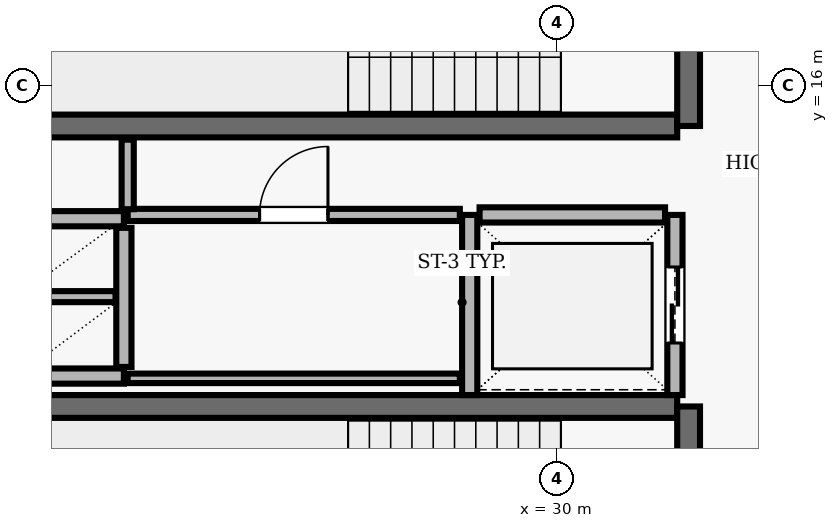
"""IFC4 building model, lengths in metres.
Left out: names, types, materials, properties, quantities, classifications, styles, units other than length and angle.
Written with IfcOpenShell. Run it as: python <this file> out.ifc"""

import sys

from ifc_helpers import new_model, si_unit, direction, frame, frame_2d, origin, place, context, subcontext, project, spatial, rectangle, extrude, element, fill, save


model = new_model("IFC4")
c1 = context("Model", 3, precision=1e-05, world=origin(), true_north=direction((0.0, 1.0)))
c2 = subcontext(c1, "Body", "Model", "MODEL_VIEW")
j1 = project(units=[si_unit("LENGTHUNIT", "METRE"), si_unit("PLANEANGLEUNIT", "RADIAN")], contexts=[c1])
p1 = place(None, origin())
s1 = spatial("IfcSite", under=j1, at=p1, CompositionType="ELEMENT")
p2 = place(p1, origin())
s2 = spatial("IfcBuilding", under=s1, at=p2, CompositionType="ELEMENT")
p3 = place(p2, frame((0.0, 0.0, 275.5)))
s3 = spatial("IfcBuildingStorey", under=s2, at=p3, CompositionType="ELEMENT", Elevation=275.5)
p4 = place(p3, frame((23.22, 15.47, 0.0), z_axis=(0.0, 0.0, 1.0), x_axis=(1.0, 0.0, 0.0)))
e1 = element("IfcWall", 1, at=p4, inside=s3, PredefinedType="SHEAR", context=c2, shape_type="SweptSolid", body=[
    extrude(rectangle(XDim=8.36, YDim=0.3, at=frame_2d((4.18, 0.0))), origin(), (0.0, 0.0, 1.0), 3.69),
])
p5 = place(p3, frame((31.73, 15.47, 0.0), z_axis=(0.0, 0.0, 1.0), x_axis=(0.0, 1.0, 0.0)))
e2 = element("IfcWall", 2, at=p5, inside=s3, PredefinedType="SHEAR", context=c2, shape_type="SweptSolid", body=[
    extrude(rectangle(XDim=3.51, YDim=0.3, at=frame_2d((1.755, 0.0))), origin(), (0.0, 0.0, 1.0), 3.69),
])
p6 = place(p5, frame((1.18, 0.0, 0.0)))
e3 = element("IfcOpeningElement", 3, at=p6, cuts=e2, PredefinedType="OPENING", context=c2, shape_type="SweptSolid", body=[
    extrude(rectangle(XDim=1.15, YDim=2.15, at=frame_2d((0.575, 1.075))), frame((0.0, 0.16, 0.0), z_axis=(0.0, -1.0, 0.0), x_axis=(1.0, 0.0, 0.0)), (0.0, 0.0, 1.0), 0.32),
])
p7 = place(p3, frame((31.58, 11.78, 0.0), z_axis=(0.0, 0.0, 1.0), x_axis=(-1.0, 0.0, 0.0)))
e4 = element("IfcWall", 4, at=p7, inside=s3, PredefinedType="SHEAR", context=c2, shape_type="SweptSolid", body=[
    extrude(rectangle(XDim=8.36, YDim=0.3, at=frame_2d((4.18, 0.0))), origin(), (0.0, 0.0, 1.0), 3.69),
])
p8 = place(p3, frame((31.73, 8.27, 0.0), z_axis=(0.0, 0.0, 1.0), x_axis=(0.0, 1.0, 0.0)))
e5 = element("IfcWall", 5, at=p8, inside=s3, PredefinedType="SHEAR", context=c2, shape_type="SweptSolid", body=[
    extrude(rectangle(XDim=3.51, YDim=0.3, at=frame_2d((1.755, 0.0))), origin(), (0.0, 0.0, 1.0), 3.69),
])
p9 = place(p8, frame((1.18, 0.0, 0.0)))
e6 = element("IfcOpeningElement", 6, at=p9, cuts=e5, PredefinedType="OPENING", context=c2, shape_type="SweptSolid", body=[
    extrude(rectangle(XDim=1.15, YDim=2.15, at=frame_2d((0.575, 1.075))), frame((0.0, 0.16, 0.0), z_axis=(0.0, -1.0, 0.0), x_axis=(1.0, 0.0, 0.0)), (0.0, 0.0, 1.0), 0.32),
])
p10 = place(p3, frame((28.85, 14.3, 0.0), z_axis=(0.0, 0.0, 1.0), x_axis=(0.0, -1.0, 0.0)))
e7 = element("IfcWall", 7, at=p10, inside=s3, PredefinedType="SOLIDWALL", context=c2, shape_type="SweptSolid", body=[
    extrude(rectangle(XDim=2.37, YDim=0.2, at=frame_2d((1.185, 0.0))), origin(), (0.0, 0.0, 1.0), 3.69),
])
p11 = place(p3, frame((31.55, 11.93, 0.0), z_axis=(0.0, 0.0, 1.0), x_axis=(0.0, 1.0, 0.0)))
e8 = element("IfcWall", 8, at=p11, inside=s3, PredefinedType="SOLIDWALL", context=c2, shape_type="SweptSolid", body=[
    extrude(rectangle(XDim=2.37, YDim=0.2, at=frame_2d((1.185, 0.0))), origin(), (0.0, 0.0, 1.0), 3.69),
])
p12 = place(p11, frame((0.685, 0.0, 0.0)))
e9 = element("IfcOpeningElement", 9, at=p12, cuts=e8, PredefinedType="OPENING", context=c2, shape_type="SweptSolid", body=[
    extrude(rectangle(XDim=1.0, YDim=2.1, at=frame_2d((0.5, 1.05))), frame((0.0, 0.11, 0.0), z_axis=(0.0, -1.0, 0.0), x_axis=(1.0, 0.0, 0.0)), (0.0, 0.0, 1.0), 0.22),
])
p13 = place(p3, frame((31.42, 14.3, 0.0), z_axis=(0.0, 0.0, 1.0), x_axis=(-1.0, 0.0, 0.0)))
e10 = element("IfcWall", 10, at=p13, inside=s3, PredefinedType="SOLIDWALL", context=c2, shape_type="SweptSolid", body=[
    extrude(rectangle(XDim=2.44, YDim=0.2, at=frame_2d((1.22, 0.0))), origin(), (0.0, 0.0, 1.0), 3.69),
])
for number, where, z_axis, x_axis in (
    (11, (22.9, 14.25, 0.0), (0.0, 0.0, 1.0), (1.0, 0.0, 0.0)),
    (12, (22.9, 12.18, 0.0), (0.0, 0.0, 1.0), (1.0, 0.0, 0.0)),
):
    element("IfcWall", number, at=place(p3, frame(where, z_axis=z_axis, x_axis=x_axis)), inside=s3, PredefinedType="SOLIDWALL", context=c2, shape_type="SweptSolid", body=[
        extrude(rectangle(XDim=1.4, YDim=0.2, at=frame_2d((0.7, 0.0))), origin(), (0.0, 0.0, 1.0), 3.69),
    ])
p14 = place(p3, frame((24.3, 12.3, 0.0), z_axis=(0.0, 0.0, 1.0), x_axis=(0.0, 1.0, 0.0)))
e13 = element("IfcWall", 13, at=p14, inside=s3, PredefinedType="SOLIDWALL", context=c2, shape_type="SweptSolid", body=[
    extrude(rectangle(XDim=1.83, YDim=0.2, at=frame_2d((0.915, 0.0))), origin(), (0.0, 0.0, 1.0), 3.69),
])
p15 = place(p3, frame((23.01, 13.225, 0.0), z_axis=(0.0, 0.0, 1.0), x_axis=(1.0, 0.0, 0.0)))
e14 = element("IfcWall", 14, at=p15, inside=s3, PredefinedType="PARTITIONING", context=c2, shape_type="SweptSolid", body=[
    extrude(rectangle(XDim=1.18, YDim=0.145, at=frame_2d((0.59, 0.0))), origin(), (0.0, 0.0, 1.0), 3.69),
])
p16 = place(p3, frame((24.35, 12.15, 0.0), z_axis=(0.0, 0.0, 1.0), x_axis=(1.0, 0.0, 0.0)))
e15 = element("IfcWall", 15, at=p16, inside=s3, PredefinedType="PARTITIONING", context=c2, shape_type="SweptSolid", body=[
    extrude(rectangle(XDim=4.37, YDim=0.125, at=frame_2d((2.185, 0.0))), origin(), (0.0, 0.0, 1.0), 3.69),
])
p17 = place(p3, frame((24.35, 14.3, 0.0), z_axis=(0.0, 0.0, 1.0), x_axis=(1.0, 0.0, 0.0)))
e16 = element("IfcWall", 16, at=p17, inside=s3, PredefinedType="PARTITIONING", context=c2, shape_type="SweptSolid", body=[
    extrude(rectangle(XDim=4.37, YDim=0.16, at=frame_2d((2.185, 0.0))), origin(), (0.0, 0.0, 1.0), 3.69),
])
p18 = place(p17, frame((1.735, 0.0, 0.0)))
e17 = element("IfcOpeningElement", 17, at=p18, cuts=e16, PredefinedType="OPENING", context=c2, shape_type="SweptSolid", body=[
    extrude(rectangle(XDim=0.9, YDim=2.1, at=frame_2d((0.45, 1.05))), frame((0.0, 0.09, 0.0), z_axis=(0.0, -1.0, 0.0), x_axis=(1.0, 0.0, 0.0)), (0.0, 0.0, 1.0), 0.18),
])
p19 = place(p3, frame((24.35, 15.29, 0.0), z_axis=(0.0, 0.0, 1.0), x_axis=(0.0, -1.0, 0.0)))
e18 = element("IfcWall", 18, at=p19, inside=s3, PredefinedType="PARTITIONING", context=c2, shape_type="SweptSolid", body=[
    extrude(rectangle(XDim=0.915, YDim=0.16, at=frame_2d((0.458, 0.0))), origin(), (0.0, 0.0, 1.0), 3.69),
])
p20 = place(p12, origin())
e19 = element("IfcDoor", 19, at=p20, inside=s3, OperationType="DOUBLE_DOOR_SLIDING", PredefinedType="DOOR", context=c2, shape_type="SweptSolid", body=[
    extrude(rectangle(XDim=1.0, YDim=2.1, at=frame_2d((0.5, 1.05))), frame((0.0, 0.025, 0.0), z_axis=(0.0, -1.0, 0.0), x_axis=(1.0, 0.0, 0.0)), (0.0, 0.0, 1.0), 0.05),
])
fill(e9, e19)
p21 = place(p18, origin())
e20 = element("IfcDoor", 20, at=p21, inside=s3, OperationType="SINGLE_SWING_RIGHT", PredefinedType="DOOR", context=c2, shape_type="SweptSolid", body=[
    extrude(rectangle(XDim=0.9, YDim=2.1, at=frame_2d((0.45, 1.05))), frame((0.0, 0.025, 0.0), z_axis=(0.0, -1.0, 0.0), x_axis=(1.0, 0.0, 0.0)), (0.0, 0.0, 1.0), 0.05),
])
fill(e17, e20)
save(model, sys.argv[1])
